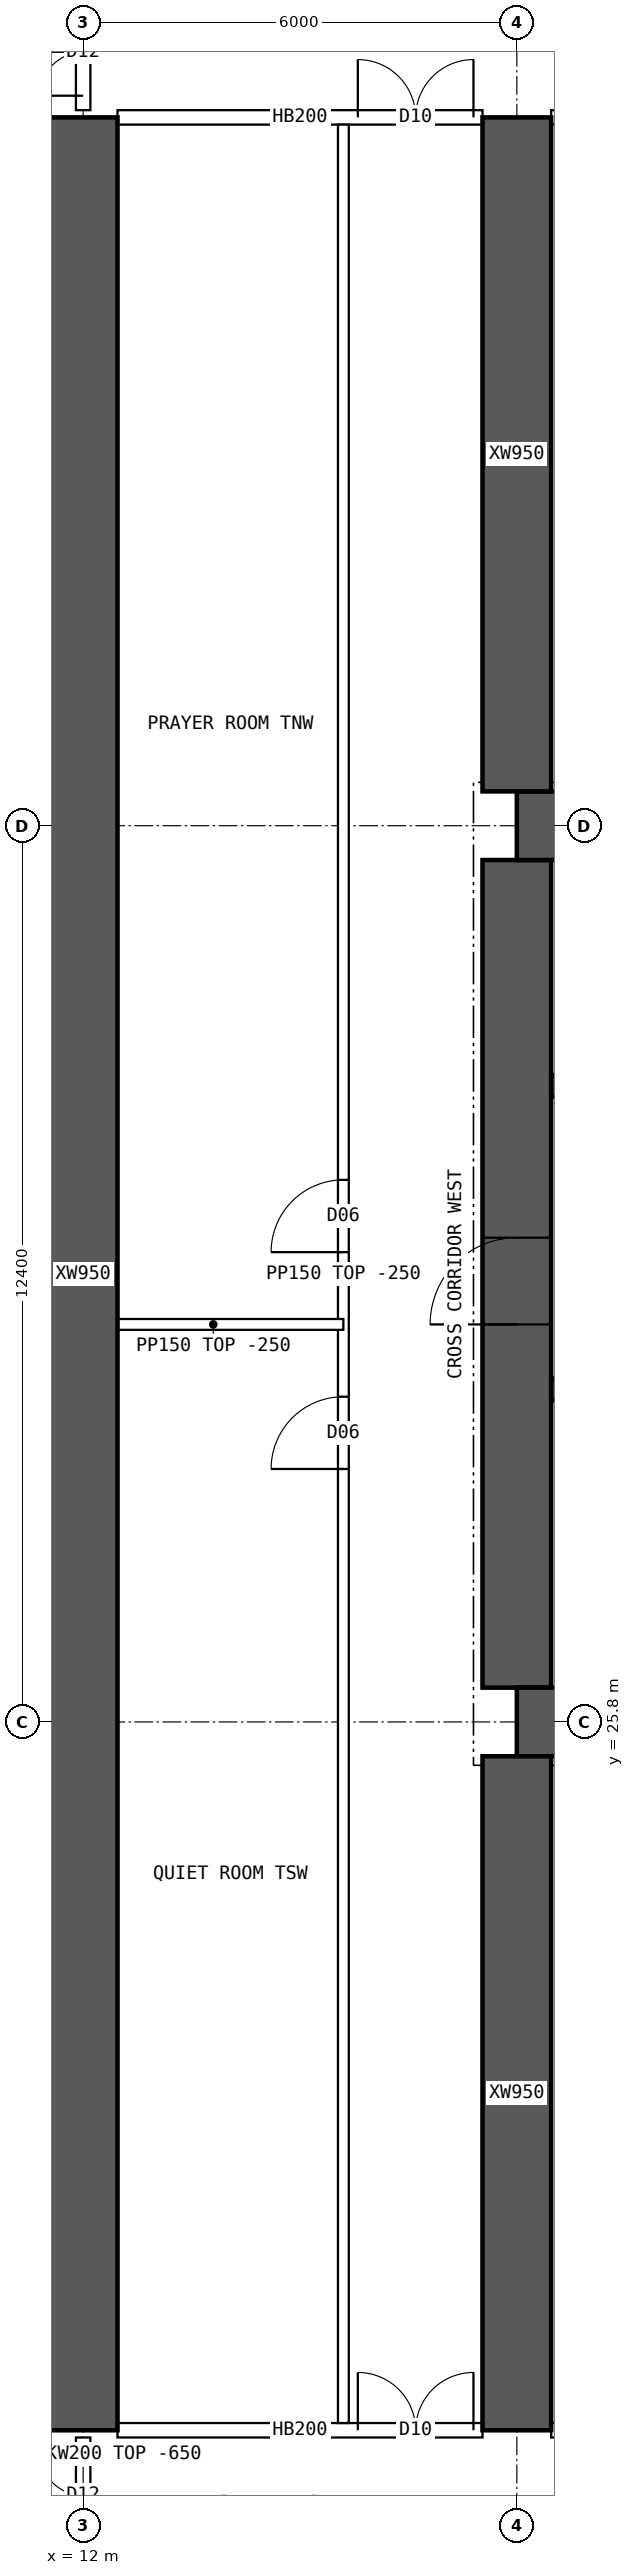
"""IFC4 building model, lengths in metres.
Left out: names, types, materials, properties, quantities, classifications, styles, units other than length and angle.
Written with IfcOpenShell. Run it as: python <this file> out.ifc"""

import sys

from ifc_helpers import new_model, si_unit, direction, frame, frame_2d, origin, place, context, subcontext, project, spatial, polyline, rectangle, outline, extrude, element, fill, save


model = new_model("IFC4")
c1 = context("Model", 3, precision=1e-05, world=origin(), true_north=direction((0.0, 1.0)))
c2 = subcontext(c1, "Body", "Model", "MODEL_VIEW")
j1 = project(units=[si_unit("LENGTHUNIT", "METRE"), si_unit("PLANEANGLEUNIT", "RADIAN")], contexts=[c1])
p1 = place(None, origin())
s1 = spatial("IfcSite", under=j1, at=p1, CompositionType="ELEMENT")
p2 = place(p1, origin())
s2 = spatial("IfcBuilding", under=s1, at=p2, CompositionType="ELEMENT")
p3 = place(p2, frame((0.0, 0.0, 84.4)))
s3 = spatial("IfcBuildingStorey", under=s2, at=p3, CompositionType="ELEMENT", Elevation=84.4)
for number, where, z_axis, x_axis in (
    (1, (18.0, 25.8, 0.0), (0.0, 0.0, 1.0), (1.0, 0.0, 0.0)),
    (2, (18.0, 38.2, 0.0), (0.0, 0.0, 1.0), (1.0, 0.0, 0.0)),
):
    element("IfcWall", number, at=place(p3, frame(where, z_axis=z_axis, x_axis=x_axis)), inside=s3, PredefinedType="SHEAR", context=c2, shape_type="SweptSolid", body=[
        extrude(rectangle(XDim=48.0, YDim=0.95, at=frame_2d((24.0, 0.0))), origin(), (0.0, 0.0, 1.0), 3.75),
    ])
p4 = place(p3, frame((18.0, 26.275, 0.0), z_axis=(0.0, 0.0, 1.0), x_axis=(0.0, 1.0, 0.0)))
e3 = element("IfcWall", 3, at=p4, inside=s3, PredefinedType="SHEAR", context=c2, shape_type="SweptSolid", body=[
    extrude(rectangle(XDim=11.45, YDim=0.95, at=frame_2d((5.725, 0.0))), origin(), (0.0, 0.0, 1.0), 3.75),
])
p5 = place(p4, frame((5.025, 0.0, 0.0)))
e4 = element("IfcOpeningElement", 4, at=p5, cuts=e3, PredefinedType="OPENING", context=c2, shape_type="SweptSolid", body=[
    extrude(rectangle(XDim=1.2, YDim=2.1, at=frame_2d((0.6, 1.05))), frame((0.0, 0.485, 0.0), z_axis=(0.0, -1.0, 0.0), x_axis=(1.0, 0.0, 0.0)), (0.0, 0.0, 1.0), 0.97),
])
p6 = place(p3, frame((18.475, 30.4, 0.0), z_axis=(0.0, 0.0, 1.0), x_axis=(1.0, 0.0, 0.0)))
e5 = element("IfcWall", 5, at=p6, inside=s3, PredefinedType="SHEAR", context=c2, shape_type="SweptSolid", body=[
    extrude(rectangle(XDim=47.05, YDim=0.3, at=frame_2d((23.525, 0.0))), origin(), (0.0, 0.0, 1.0), 3.75),
])
p7 = place(p6, frame((0.4, 0.0, 0.0)))
e6 = element("IfcOpeningElement", 6, at=p7, cuts=e5, PredefinedType="OPENING", context=c2, shape_type="SweptSolid", body=[
    extrude(rectangle(XDim=1.0, YDim=2.1, at=frame_2d((0.5, 1.05))), frame((0.0, 0.16, 0.0), z_axis=(0.0, -1.0, 0.0), x_axis=(1.0, 0.0, 0.0)), (0.0, 0.0, 1.0), 0.32),
])
p8 = place(p6, frame((45.65, 0.0, 0.0)))
e7 = element("IfcOpeningElement", 7, at=p8, cuts=e5, PredefinedType="OPENING", context=c2, shape_type="SweptSolid", body=[
    extrude(rectangle(XDim=1.0, YDim=2.1, at=frame_2d((0.5, 1.05))), frame((0.0, 0.16, 0.0), z_axis=(0.0, -1.0, 0.0), x_axis=(1.0, 0.0, 0.0)), (0.0, 0.0, 1.0), 0.32),
])
p9 = place(p6, frame((8.275, 0.0, 0.0)))
e8 = element("IfcOpeningElement", 8, at=p9, cuts=e5, PredefinedType="OPENING", context=c2, shape_type="SweptSolid", body=[
    extrude(rectangle(XDim=1.1, YDim=2.1, at=frame_2d((0.55, 1.05))), frame((0.0, 0.16, 0.0), z_axis=(0.0, -1.0, 0.0), x_axis=(1.0, 0.0, 0.0)), (0.0, 0.0, 1.0), 0.32),
])
p10 = place(p6, frame((10.875, 0.0, 0.0)))
e9 = element("IfcOpeningElement", 9, at=p10, cuts=e5, PredefinedType="OPENING", context=c2, shape_type="SweptSolid", body=[
    extrude(rectangle(XDim=1.1, YDim=2.1, at=frame_2d((0.55, 1.05))), frame((0.0, 0.16, 0.0), z_axis=(0.0, -1.0, 0.0), x_axis=(1.0, 0.0, 0.0)), (0.0, 0.0, 1.0), 0.32),
])
p11 = place(p6, frame((13.475, 0.0, 0.0)))
e10 = element("IfcOpeningElement", 10, at=p11, cuts=e5, PredefinedType="OPENING", context=c2, shape_type="SweptSolid", body=[
    extrude(rectangle(XDim=1.1, YDim=2.1, at=frame_2d((0.55, 1.05))), frame((0.0, 0.16, 0.0), z_axis=(0.0, -1.0, 0.0), x_axis=(1.0, 0.0, 0.0)), (0.0, 0.0, 1.0), 0.32),
])
p12 = place(p6, frame((16.075, 0.0, 0.0)))
e11 = element("IfcOpeningElement", 11, at=p12, cuts=e5, PredefinedType="OPENING", context=c2, shape_type="SweptSolid", body=[
    extrude(rectangle(XDim=1.1, YDim=2.1, at=frame_2d((0.55, 1.05))), frame((0.0, 0.16, 0.0), z_axis=(0.0, -1.0, 0.0), x_axis=(1.0, 0.0, 0.0)), (0.0, 0.0, 1.0), 0.32),
])
p13 = place(p6, frame((18.85, 0.0, 0.0)))
e12 = element("IfcOpeningElement", 12, at=p13, cuts=e5, PredefinedType="OPENING", context=c2, shape_type="SweptSolid", body=[
    extrude(rectangle(XDim=0.9, YDim=2.1, at=frame_2d((0.45, 1.05))), frame((0.0, 0.16, 0.0), z_axis=(0.0, -1.0, 0.0), x_axis=(1.0, 0.0, 0.0)), (0.0, 0.0, 1.0), 0.32),
])
p14 = place(p6, frame((30.142, 0.0, 0.0)))
e13 = element("IfcOpeningElement", 13, at=p14, cuts=e5, PredefinedType="OPENING", context=c2, shape_type="SweptSolid", body=[
    extrude(rectangle(XDim=1.1, YDim=2.1, at=frame_2d((0.55, 1.05))), frame((0.0, 0.16, 0.0), z_axis=(0.0, -1.0, 0.0), x_axis=(1.0, 0.0, 0.0)), (0.0, 0.0, 1.0), 0.32),
])
p15 = place(p6, frame((33.675, 0.0, 0.0)))
e14 = element("IfcOpeningElement", 14, at=p15, cuts=e5, PredefinedType="OPENING", context=c2, shape_type="SweptSolid", body=[
    extrude(rectangle(XDim=1.1, YDim=2.1, at=frame_2d((0.55, 1.05))), frame((0.0, 0.16, 0.0), z_axis=(0.0, -1.0, 0.0), x_axis=(1.0, 0.0, 0.0)), (0.0, 0.0, 1.0), 0.32),
])
p16 = place(p6, frame((37.208, 0.0, 0.0)))
e15 = element("IfcOpeningElement", 15, at=p16, cuts=e5, PredefinedType="OPENING", context=c2, shape_type="SweptSolid", body=[
    extrude(rectangle(XDim=1.1, YDim=2.1, at=frame_2d((0.55, 1.05))), frame((0.0, 0.16, 0.0), z_axis=(0.0, -1.0, 0.0), x_axis=(1.0, 0.0, 0.0)), (0.0, 0.0, 1.0), 0.32),
])
p17 = place(p3, frame((18.475, 34.6, 0.0), z_axis=(0.0, 0.0, 1.0), x_axis=(1.0, 0.0, 0.0)))
e16 = element("IfcWall", 16, at=p17, inside=s3, PredefinedType="SHEAR", context=c2, shape_type="SweptSolid", body=[
    extrude(rectangle(XDim=47.05, YDim=0.3, at=frame_2d((23.525, 0.0))), origin(), (0.0, 0.0, 1.0), 3.75),
])
p18 = place(p17, frame((0.9, 0.0, 0.0)))
e17 = element("IfcOpeningElement", 17, at=p18, cuts=e16, PredefinedType="OPENING", context=c2, shape_type="SweptSolid", body=[
    extrude(rectangle(XDim=1.1, YDim=2.1, at=frame_2d((0.55, 1.05))), frame((0.0, 0.16, 0.0), z_axis=(0.0, -1.0, 0.0), x_axis=(1.0, 0.0, 0.0)), (0.0, 0.0, 1.0), 0.32),
])
p19 = place(p17, frame((45.05, 0.0, 0.0)))
e18 = element("IfcOpeningElement", 18, at=p19, cuts=e16, PredefinedType="OPENING", context=c2, shape_type="SweptSolid", body=[
    extrude(rectangle(XDim=1.1, YDim=2.1, at=frame_2d((0.55, 1.05))), frame((0.0, 0.16, 0.0), z_axis=(0.0, -1.0, 0.0), x_axis=(1.0, 0.0, 0.0)), (0.0, 0.0, 1.0), 0.32),
])
p20 = place(p17, frame((4.125, 0.0, 0.0)))
e19 = element("IfcOpeningElement", 19, at=p20, cuts=e16, PredefinedType="OPENING", context=c2, shape_type="SweptSolid", body=[
    extrude(rectangle(XDim=0.9, YDim=2.1, at=frame_2d((0.45, 1.05))), frame((0.0, 0.16, 0.0), z_axis=(0.0, -1.0, 0.0), x_axis=(1.0, 0.0, 0.0)), (0.0, 0.0, 1.0), 0.32),
])
p21 = place(p17, frame((42.025, 0.0, 0.0)))
e20 = element("IfcOpeningElement", 20, at=p21, cuts=e16, PredefinedType="OPENING", context=c2, shape_type="SweptSolid", body=[
    extrude(rectangle(XDim=0.9, YDim=2.1, at=frame_2d((0.45, 1.05))), frame((0.0, 0.16, 0.0), z_axis=(0.0, -1.0, 0.0), x_axis=(1.0, 0.0, 0.0)), (0.0, 0.0, 1.0), 0.32),
])
p22 = place(p17, frame((8.9, 0.0, 0.0)))
e21 = element("IfcOpeningElement", 21, at=p22, cuts=e16, PredefinedType="OPENING", context=c2, shape_type="SweptSolid", body=[
    extrude(rectangle(XDim=0.9, YDim=2.1, at=frame_2d((0.45, 1.05))), frame((0.0, 0.16, 0.0), z_axis=(0.0, -1.0, 0.0), x_axis=(1.0, 0.0, 0.0)), (0.0, 0.0, 1.0), 0.32),
])
p23 = place(p17, frame((12.874, 0.0, 0.0)))
e22 = element("IfcOpeningElement", 22, at=p23, cuts=e16, PredefinedType="OPENING", context=c2, shape_type="SweptSolid", body=[
    extrude(rectangle(XDim=0.9, YDim=2.1, at=frame_2d((0.45, 1.05))), frame((0.0, 0.16, 0.0), z_axis=(0.0, -1.0, 0.0), x_axis=(1.0, 0.0, 0.0)), (0.0, 0.0, 1.0), 0.32),
])
p24 = place(p17, frame((16.521, 0.0, 0.0)))
e23 = element("IfcOpeningElement", 23, at=p24, cuts=e16, PredefinedType="OPENING", context=c2, shape_type="SweptSolid", body=[
    extrude(rectangle(XDim=0.9, YDim=2.1, at=frame_2d((0.45, 1.05))), frame((0.0, 0.16, 0.0), z_axis=(0.0, -1.0, 0.0), x_axis=(1.0, 0.0, 0.0)), (0.0, 0.0, 1.0), 0.32),
])
p25 = place(p17, frame((20.28, 0.0, 0.0)))
e24 = element("IfcOpeningElement", 24, at=p25, cuts=e16, PredefinedType="OPENING", context=c2, shape_type="SweptSolid", body=[
    extrude(rectangle(XDim=0.9, YDim=2.1, at=frame_2d((0.45, 1.05))), frame((0.0, 0.16, 0.0), z_axis=(0.0, -1.0, 0.0), x_axis=(1.0, 0.0, 0.0)), (0.0, 0.0, 1.0), 0.32),
])
p26 = place(p17, frame((24.686, 0.0, 0.0)))
e25 = element("IfcOpeningElement", 25, at=p26, cuts=e16, PredefinedType="OPENING", context=c2, shape_type="SweptSolid", body=[
    extrude(rectangle(XDim=0.9, YDim=2.1, at=frame_2d((0.45, 1.05))), frame((0.0, 0.16, 0.0), z_axis=(0.0, -1.0, 0.0), x_axis=(1.0, 0.0, 0.0)), (0.0, 0.0, 1.0), 0.32),
])
p27 = place(p17, frame((27.483, 0.0, 0.0)))
e26 = element("IfcOpeningElement", 26, at=p27, cuts=e16, PredefinedType="OPENING", context=c2, shape_type="SweptSolid", body=[
    extrude(rectangle(XDim=0.9, YDim=2.1, at=frame_2d((0.45, 1.05))), frame((0.0, 0.16, 0.0), z_axis=(0.0, -1.0, 0.0), x_axis=(1.0, 0.0, 0.0)), (0.0, 0.0, 1.0), 0.32),
])
p28 = place(p17, frame((33.604, 0.0, 0.0)))
e27 = element("IfcOpeningElement", 27, at=p28, cuts=e16, PredefinedType="OPENING", context=c2, shape_type="SweptSolid", body=[
    extrude(rectangle(XDim=0.9, YDim=2.1, at=frame_2d((0.45, 1.05))), frame((0.0, 0.16, 0.0), z_axis=(0.0, -1.0, 0.0), x_axis=(1.0, 0.0, 0.0)), (0.0, 0.0, 1.0), 0.32),
])
p29 = place(p3, frame((12.0, 16.0, 0.0), z_axis=(0.0, 0.0, 1.0), x_axis=(0.0, 1.0, 0.0)))
e28 = element("IfcWall", 28, at=p29, inside=s3, PredefinedType="SHEAR", context=c2, shape_type="SweptSolid", body=[
    extrude(rectangle(XDim=32.0, YDim=0.95, at=frame_2d((16.0, 0.0))), origin(), (0.0, 0.0, 1.0), 3.75),
])
for number, where, z_axis, x_axis in (
    (29, (18.0, 16.0, 0.0), (0.0, 0.0, 1.0), (0.0, 1.0, 0.0)),
    (30, (18.0, 38.675, 0.0), (0.0, 0.0, 1.0), (0.0, 1.0, 0.0)),
):
    element("IfcWall", number, at=place(p3, frame(where, z_axis=z_axis, x_axis=x_axis)), inside=s3, PredefinedType="SHEAR", context=c2, shape_type="SweptSolid", body=[
        extrude(rectangle(XDim=9.325, YDim=0.95, at=frame_2d((4.663, 0.0))), origin(), (0.0, 0.0, 1.0), 3.75),
    ])
p30 = place(p3, frame((12.475, 16.0, 0.0), z_axis=(0.0, 0.0, 1.0), x_axis=(1.0, 0.0, 0.0)))
e31 = element("IfcWall", 31, at=p30, inside=s3, PredefinedType="SOLIDWALL", context=c2, shape_type="SweptSolid", body=[
    extrude(rectangle(XDim=5.05, YDim=0.2, at=frame_2d((2.525, 0.0))), origin(), (0.0, 0.0, 1.0), 3.5),
])
p31 = place(p30, frame((3.325, 0.0, 0.0)))
e32 = element("IfcOpeningElement", 32, at=p31, cuts=e31, PredefinedType="OPENING", context=c2, shape_type="SweptSolid", body=[
    extrude(rectangle(XDim=1.6, YDim=2.1, at=frame_2d((0.8, 1.05))), frame((0.0, 0.11, 0.0), z_axis=(0.0, -1.0, 0.0), x_axis=(1.0, 0.0, 0.0)), (0.0, 0.0, 1.0), 0.22),
])
p32 = place(p3, frame((18.475, 16.0, 0.0), z_axis=(0.0, 0.0, 1.0), x_axis=(1.0, 0.0, 0.0)))
e33 = element("IfcWall", 33, at=p32, inside=s3, PredefinedType="SOLIDWALL", context=c2, shape_type="SweptSolid", body=[
    extrude(rectangle(XDim=5.05, YDim=0.2, at=frame_2d((2.525, 0.0))), origin(), (0.0, 0.0, 1.0), 3.5),
])
p33 = place(p32, frame((0.35, 0.0, 0.0)))
e34 = element("IfcOpeningElement", 34, at=p33, cuts=e33, PredefinedType="OPENING", context=c2, shape_type="SweptSolid", body=[
    extrude(rectangle(XDim=0.9, YDim=2.1, at=frame_2d((0.45, 1.05))), frame((0.0, 0.11, 0.0), z_axis=(0.0, -1.0, 0.0), x_axis=(1.0, 0.0, 0.0)), (0.0, 0.0, 1.0), 0.22),
])
p34 = place(p32, frame((3.215, 0.0, 0.0)))
e35 = element("IfcOpeningElement", 35, at=p34, cuts=e33, PredefinedType="OPENING", context=c2, shape_type="SweptSolid", body=[
    extrude(rectangle(XDim=0.9, YDim=2.1, at=frame_2d((0.45, 1.05))), frame((0.0, 0.11, 0.0), z_axis=(0.0, -1.0, 0.0), x_axis=(1.0, 0.0, 0.0)), (0.0, 0.0, 1.0), 0.22),
])
p35 = place(p3, frame((12.475, 48.0, 0.0), z_axis=(0.0, 0.0, 1.0), x_axis=(1.0, 0.0, 0.0)))
e36 = element("IfcWall", 36, at=p35, inside=s3, PredefinedType="SOLIDWALL", context=c2, shape_type="SweptSolid", body=[
    extrude(rectangle(XDim=5.05, YDim=0.2, at=frame_2d((2.525, 0.0))), origin(), (0.0, 0.0, 1.0), 3.5),
])
p36 = place(p35, frame((3.325, 0.0, 0.0)))
e37 = element("IfcOpeningElement", 37, at=p36, cuts=e36, PredefinedType="OPENING", context=c2, shape_type="SweptSolid", body=[
    extrude(rectangle(XDim=1.6, YDim=2.1, at=frame_2d((0.8, 1.05))), frame((0.0, 0.11, 0.0), z_axis=(0.0, -1.0, 0.0), x_axis=(1.0, 0.0, 0.0)), (0.0, 0.0, 1.0), 0.22),
])
p37 = place(p3, frame((18.475, 48.0, 0.0), z_axis=(0.0, 0.0, 1.0), x_axis=(1.0, 0.0, 0.0)))
e38 = element("IfcWall", 38, at=p37, inside=s3, PredefinedType="SOLIDWALL", context=c2, shape_type="SweptSolid", body=[
    extrude(rectangle(XDim=5.05, YDim=0.2, at=frame_2d((2.525, 0.0))), origin(), (0.0, 0.0, 1.0), 3.5),
])
p38 = place(p37, frame((0.8, 0.0, 0.0)))
e39 = element("IfcOpeningElement", 39, at=p38, cuts=e38, PredefinedType="OPENING", context=c2, shape_type="SweptSolid", body=[
    extrude(rectangle(XDim=1.0, YDim=2.1, at=frame_2d((0.5, 1.05))), frame((0.0, 0.11, 0.0), z_axis=(0.0, -1.0, 0.0), x_axis=(1.0, 0.0, 0.0)), (0.0, 0.0, 1.0), 0.22),
])
p39 = place(p3, frame((15.6, 16.1, 0.0), z_axis=(0.0, 0.0, 1.0), x_axis=(0.0, 1.0, 0.0)))
e40 = element("IfcWall", 40, at=p39, inside=s3, PredefinedType="PARTITIONING", context=c2, shape_type="SweptSolid", body=[
    extrude(rectangle(XDim=31.8, YDim=0.15, at=frame_2d((15.9, 0.0))), origin(), (0.0, 0.0, 1.0), 3.5),
])
p40 = place(p39, frame((13.2, 0.0, 0.0)))
e41 = element("IfcOpeningElement", 41, at=p40, cuts=e40, PredefinedType="OPENING", context=c2, shape_type="SweptSolid", body=[
    extrude(rectangle(XDim=1.0, YDim=2.1, at=frame_2d((0.5, 1.05))), frame((0.0, 0.085, 0.0), z_axis=(0.0, -1.0, 0.0), x_axis=(1.0, 0.0, 0.0)), (0.0, 0.0, 1.0), 0.17),
])
p41 = place(p39, frame((16.2, 0.0, 0.0)))
e42 = element("IfcOpeningElement", 42, at=p41, cuts=e40, PredefinedType="OPENING", context=c2, shape_type="SweptSolid", body=[
    extrude(rectangle(XDim=1.0, YDim=2.1, at=frame_2d((0.5, 1.05))), frame((0.0, 0.085, 0.0), z_axis=(0.0, -1.0, 0.0), x_axis=(1.0, 0.0, 0.0)), (0.0, 0.0, 1.0), 0.17),
])
p42 = place(p3, frame((12.0, 31.3, 0.0), z_axis=(0.0, 0.0, 1.0), x_axis=(1.0, 0.0, 0.0)))
e43 = element("IfcWall", 43, at=p42, inside=s3, PredefinedType="PARTITIONING", context=c2, shape_type="SweptSolid", body=[
    extrude(rectangle(XDim=3.6, YDim=0.15, at=frame_2d((1.8, 0.0))), origin(), (0.0, 0.0, 1.0), 3.5),
])
p43 = place(p3, frame((3.905, 30.85, 0.0), z_axis=(0.0, 0.0, 1.0), x_axis=(1.0, 0.0, 0.0)))
e44 = element("IfcWall", 44, at=p43, inside=s3, PredefinedType="PARTITIONING", context=c2, shape_type="SweptSolid", body=[
    extrude(outline(polyline([(0.0, 0.0), (8.02, 0.0), (8.02, 3.5), (2.397, 3.5), (2.395, 3.05), (1.797, 3.05), (1.795, 3.5), (0.0, 3.5), (0.0, 0.0)])), frame((0.0, 0.075, 0.0), z_axis=(0.0, -1.0, 0.0), x_axis=(1.0, 0.0, 0.0)), (0.0, 0.0, 1.0), 0.15),
])
p44 = place(p3, frame((12.0, 14.3, 0.0), z_axis=(0.0, 0.0, 1.0), x_axis=(0.0, 1.0, 0.0)))
e45 = element("IfcWall", 45, at=p44, inside=s3, PredefinedType="SOLIDWALL", context=c2, shape_type="SweptSolid", body=[
    extrude(outline(polyline([(0.0, 0.0), (1.6, 0.0), (1.6, 3.1), (0.0, 3.1), (0.0, 0.0)])), frame((0.0, 0.1, 0.0), z_axis=(0.0, -1.0, 0.0), x_axis=(1.0, 0.0, 0.0)), (0.0, 0.0, 1.0), 0.2),
])
p45 = place(p44, frame((0.2, 0.0, 0.0)))
e46 = element("IfcOpeningElement", 46, at=p45, cuts=e45, PredefinedType="OPENING", context=c2, shape_type="SweptSolid", body=[
    extrude(rectangle(XDim=1.2, YDim=2.1, at=frame_2d((0.6, 1.05))), frame((0.0, 0.11, 0.0), z_axis=(0.0, -1.0, 0.0), x_axis=(1.0, 0.0, 0.0)), (0.0, 0.0, 1.0), 0.22),
])
p46 = place(p3, frame((12.0, 48.1, 0.0), z_axis=(0.0, 0.0, 1.0), x_axis=(0.0, 1.0, 0.0)))
e47 = element("IfcWall", 47, at=p46, inside=s3, PredefinedType="SOLIDWALL", context=c2, shape_type="SweptSolid", body=[
    extrude(outline(polyline([(0.0, 0.0), (1.6, 0.0), (1.6, 3.1), (0.0, 3.1), (0.0, 0.0)])), frame((0.0, 0.1, 0.0), z_axis=(0.0, -1.0, 0.0), x_axis=(1.0, 0.0, 0.0)), (0.0, 0.0, 1.0), 0.2),
])
p47 = place(p46, frame((0.2, 0.0, 0.0)))
e48 = element("IfcOpeningElement", 48, at=p47, cuts=e47, PredefinedType="OPENING", context=c2, shape_type="SweptSolid", body=[
    extrude(rectangle(XDim=1.2, YDim=2.1, at=frame_2d((0.6, 1.05))), frame((0.0, 0.11, 0.0), z_axis=(0.0, -1.0, 0.0), x_axis=(1.0, 0.0, 0.0)), (0.0, 0.0, 1.0), 0.22),
])
p48 = place(p5, origin())
e49 = element("IfcDoor", 49, at=p48, inside=s3, OperationType="SINGLE_SWING_LEFT", PredefinedType="DOOR", context=c2, shape_type="SweptSolid", body=[
    extrude(rectangle(XDim=1.2, YDim=2.1, at=frame_2d((0.6, 1.05))), frame((0.0, 0.025, 0.0), z_axis=(0.0, -1.0, 0.0), x_axis=(1.0, 0.0, 0.0)), (0.0, 0.0, 1.0), 0.05),
])
fill(e4, e49)
p49 = place(p31, origin())
e50 = element("IfcDoor", 50, at=p49, inside=s3, OperationType="DOUBLE_DOOR_SINGLE_SWING", PredefinedType="DOOR", context=c2, shape_type="SweptSolid", body=[
    extrude(rectangle(XDim=1.6, YDim=2.1, at=frame_2d((0.8, 1.05))), frame((0.0, 0.025, 0.0), z_axis=(0.0, -1.0, 0.0), x_axis=(1.0, 0.0, 0.0)), (0.0, 0.0, 1.0), 0.05),
])
fill(e32, e50)
p50 = place(p36, origin())
e51 = element("IfcDoor", 51, at=p50, inside=s3, OperationType="DOUBLE_DOOR_SINGLE_SWING", PredefinedType="DOOR", context=c2, shape_type="SweptSolid", body=[
    extrude(rectangle(XDim=1.6, YDim=2.1, at=frame_2d((0.8, 1.05))), frame((0.0, 0.025, 0.0), z_axis=(0.0, -1.0, 0.0), x_axis=(1.0, 0.0, 0.0)), (0.0, 0.0, 1.0), 0.05),
])
fill(e37, e51)
p51 = place(p40, origin())
e52 = element("IfcDoor", 52, at=p51, inside=s3, OperationType="SINGLE_SWING_LEFT", PredefinedType="DOOR", context=c2, shape_type="SweptSolid", body=[
    extrude(rectangle(XDim=1.0, YDim=2.1, at=frame_2d((0.5, 1.05))), frame((0.0, 0.025, 0.0), z_axis=(0.0, -1.0, 0.0), x_axis=(1.0, 0.0, 0.0)), (0.0, 0.0, 1.0), 0.05),
])
fill(e41, e52)
p52 = place(p41, origin())
e53 = element("IfcDoor", 53, at=p52, inside=s3, OperationType="SINGLE_SWING_LEFT", PredefinedType="DOOR", context=c2, shape_type="SweptSolid", body=[
    extrude(rectangle(XDim=1.0, YDim=2.1, at=frame_2d((0.5, 1.05))), frame((0.0, 0.025, 0.0), z_axis=(0.0, -1.0, 0.0), x_axis=(1.0, 0.0, 0.0)), (0.0, 0.0, 1.0), 0.05),
])
fill(e42, e53)
p53 = place(p45, origin())
e54 = element("IfcDoor", 54, at=p53, inside=s3, OperationType="DOUBLE_DOOR_SINGLE_SWING", PredefinedType="DOOR", context=c2, shape_type="SweptSolid", body=[
    extrude(rectangle(XDim=1.2, YDim=2.1, at=frame_2d((0.6, 1.05))), frame((0.0, 0.025, 0.0), z_axis=(0.0, -1.0, 0.0), x_axis=(1.0, 0.0, 0.0)), (0.0, 0.0, 1.0), 0.05),
])
fill(e46, e54)
p54 = place(p47, origin())
e55 = element("IfcDoor", 55, at=p54, inside=s3, OperationType="DOUBLE_DOOR_SINGLE_SWING", PredefinedType="DOOR", context=c2, shape_type="SweptSolid", body=[
    extrude(rectangle(XDim=1.2, YDim=2.1, at=frame_2d((0.6, 1.05))), frame((0.0, 0.025, 0.0), z_axis=(0.0, -1.0, 0.0), x_axis=(1.0, 0.0, 0.0)), (0.0, 0.0, 1.0), 0.05),
])
fill(e48, e55)
save(model, sys.argv[1])
